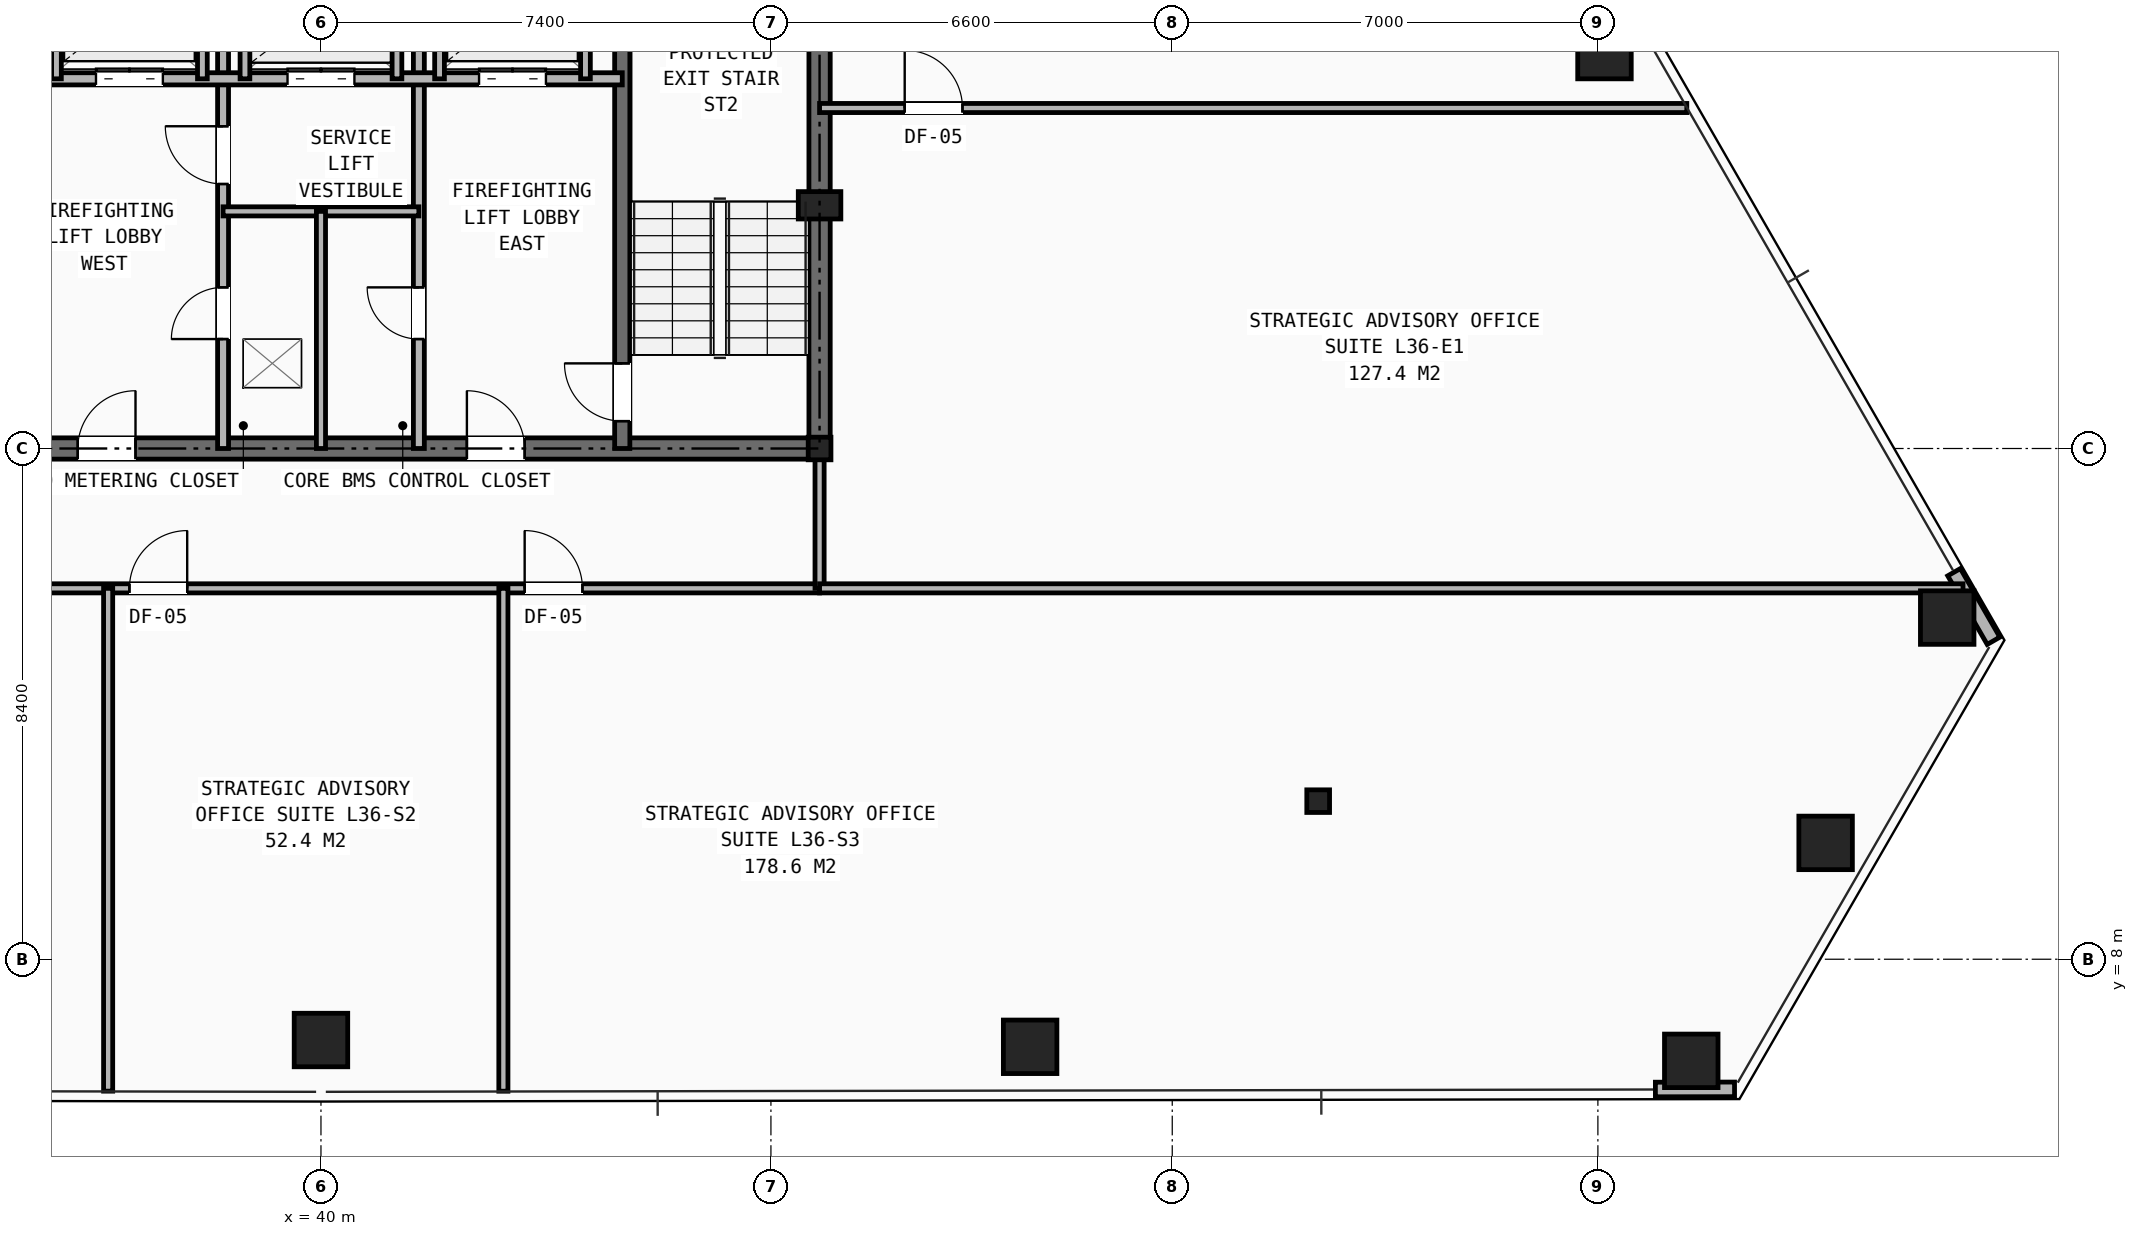
"""IFC4 building model, lengths in metres.
Left out: names, types, materials, properties, quantities, classifications, styles, units other than length and angle.
Written with IfcOpenShell. Run it as: python <this file> out.ifc"""

import sys

from ifc_helpers import new_model, si_unit, direction, frame, frame_2d, origin, origin_2d, place, context, subcontext, project, spatial, rectangle, hollow_rectangle, i_section, extrude, element, fill, save


model = new_model("IFC4")
c1 = context("Model", 3, precision=1e-05, world=origin(), true_north=direction((0.0, 1.0)))
c2 = subcontext(c1, "Body", "Model", "MODEL_VIEW")
j1 = project(units=[si_unit("LENGTHUNIT", "METRE"), si_unit("PLANEANGLEUNIT", "RADIAN")], contexts=[c1])
p1 = place(None, origin())
s1 = spatial("IfcSite", under=j1, at=p1, CompositionType="ELEMENT")
p2 = place(p1, origin())
s2 = spatial("IfcBuilding", under=s1, at=p2, CompositionType="ELEMENT")
p3 = place(p2, frame((0.0, 0.0, 126.35)))
s3 = spatial("IfcBuildingStorey", under=s2, at=p3, CompositionType="ELEMENT", Elevation=126.35)
for number, where, z_axis, x_axis in (
    (1, (48.2, 16.4, 0.0), (0.0, 0.0, 1.0), (1.0, 0.0, 0.0)),
    (2, (56.4, 10.6, 0.0), (0.0, 0.0, 1.0), (1.0, 0.0, 0.0)),
):
    element("IfcColumn", number, at=place(p3, frame(where, z_axis=z_axis, x_axis=x_axis)), inside=s3, PredefinedType="COLUMN", context=c2, shape_type="SweptSolid", body=[
        extrude(i_section(OverallWidth=0.374, OverallDepth=0.372, WebThickness=0.016, FlangeThickness=0.026, at=origin_2d()), origin(), (0.0, 0.0, 1.0), 3.45),
    ])
p4 = place(p3, frame((48.2, 20.4, 0.0), z_axis=(0.0, 0.0, 1.0), x_axis=(1.0, 0.0, 0.0)))
e3 = element("IfcColumn", 3, at=p4, inside=s3, PredefinedType="PILASTER", context=c2, shape_type="SweptSolid", body=[
    extrude(rectangle(XDim=0.7, YDim=0.45, at=origin_2d()), origin(), (0.0, 0.0, 1.0), 3.45),
])
for number, where, z_axis, x_axis in (
    (4, (40.0, 6.671, 0.0), (0.0, 0.0, 1.0), (1.0, 0.0, 0.0)),
    (5, (51.663, 6.56, 0.0), (0.0, 0.0, 1.0), (1.0, 0.0, 0.0)),
    (6, (62.536, 6.329, 0.0), (0.0, 0.0, 1.0), (1.0, 0.0, 0.0)),
    (7, (64.745, 9.913, 0.0), (0.0, 0.0, 1.0), (1.0, 0.0, 0.0)),
    (8, (66.745, 13.619, 0.0), (0.0, 0.0, 1.0), (1.0, 0.0, 0.0)),
    (9, (61.108, 22.92, 0.0), (0.0, 0.0, 1.0), (1.0, 0.0, 0.0)),
):
    element("IfcColumn", number, at=place(p3, frame(where, z_axis=z_axis, x_axis=x_axis)), inside=s3, PredefinedType="COLUMN", context=c2, shape_type="SweptSolid", body=[
        extrude(hollow_rectangle(XDim=0.88, YDim=0.88, WallThickness=0.06, at=origin_2d()), origin(), (0.0, 0.0, 1.0), 3.45),
    ])
p5 = place(p3, frame((61.946, 5.858, 0.0), z_axis=(0.0, 0.0, 1.0), x_axis=(0.999998574928, 0.001688236199, 0.0)))
e10 = element("IfcWall", 10, at=p5, inside=s3, PredefinedType="SHEAR", context=c2, shape_type="SweptSolid", body=[
    extrude(rectangle(XDim=1.302, YDim=0.24, at=frame_2d((0.651, 0.0))), origin(), (0.0, 0.0, 1.0), 2.583),
])
p6 = place(p3, frame((67.507, 13.237, 0.0), z_axis=(0.0, 0.0, 1.0), x_axis=(-0.498460550087, 0.86691238312, 0.0)))
e11 = element("IfcWall", 11, at=p6, inside=s3, PredefinedType="SHEAR", context=c2, shape_type="SweptSolid", body=[
    extrude(rectangle(XDim=1.301, YDim=0.24, at=frame_2d((0.651, 0.0))), origin(), (0.0, 0.0, 1.0), 2.583),
])
p7 = place(p3, frame((31.8, 16.4, 0.0), z_axis=(0.0, 0.0, 1.0), x_axis=(1.0, 0.0, 0.0)))
e12 = element("IfcWall", 12, at=p7, inside=s3, PredefinedType="SHEAR", context=c2, shape_type="SweptSolid", body=[
    extrude(rectangle(XDim=16.4, YDim=0.35, at=frame_2d((8.2, 0.0))), origin(), (0.0, 0.0, 1.0), 3.21),
])
p8 = place(p7, frame((4.2, 0.0, 0.0)))
e13 = element("IfcOpeningElement", 13, at=p8, cuts=e12, PredefinedType="OPENING", context=c2, shape_type="SweptSolid", body=[
    extrude(rectangle(XDim=0.95, YDim=2.1, at=frame_2d((0.475, 1.05))), frame((0.0, 0.185, 0.0), z_axis=(0.0, -1.0, 0.0), x_axis=(1.0, 0.0, 0.0)), (0.0, 0.0, 1.0), 0.37),
])
p9 = place(p7, frame((10.6, 0.0, 0.0)))
e14 = element("IfcOpeningElement", 14, at=p9, cuts=e12, PredefinedType="OPENING", context=c2, shape_type="SweptSolid", body=[
    extrude(rectangle(XDim=0.95, YDim=2.1, at=frame_2d((0.475, 1.05))), frame((0.0, 0.185, 0.0), z_axis=(0.0, -1.0, 0.0), x_axis=(1.0, 0.0, 0.0)), (0.0, 0.0, 1.0), 0.37),
])
p10 = place(p3, frame((48.2, 16.4, 0.0), z_axis=(0.0, 0.0, 1.0), x_axis=(0.0, 1.0, 0.0)))
e15 = element("IfcWall", 15, at=p10, inside=s3, PredefinedType="SHEAR", context=c2, shape_type="SweptSolid", body=[
    extrude(rectangle(XDim=14.8, YDim=0.35, at=frame_2d((7.4, 0.0))), origin(), (0.0, 0.0, 1.0), 3.21),
])
p11 = place(p10, frame((11.0, 0.0, 0.0)))
e16 = element("IfcOpeningElement", 16, at=p11, cuts=e15, PredefinedType="OPENING", context=c2, shape_type="SweptSolid", body=[
    extrude(rectangle(XDim=1.1, YDim=2.15, at=frame_2d((0.55, 1.075))), frame((0.0, 0.185, 0.0), z_axis=(0.0, -1.0, 0.0), x_axis=(1.0, 0.0, 0.0)), (0.0, 0.0, 1.0), 0.37),
])
p12 = place(p3, frame((44.955, 16.4, 0.0), z_axis=(0.0, 0.0, 1.0), x_axis=(0.0, 1.0, 0.0)))
e17 = element("IfcWall", 17, at=p12, inside=s3, PredefinedType="SHEAR", context=c2, shape_type="SweptSolid", body=[
    extrude(rectangle(XDim=8.4, YDim=0.25, at=frame_2d((4.2, 0.0))), origin(), (0.0, 0.0, 1.0), 3.21),
])
p13 = place(p12, frame((0.45, 0.0, 0.0)))
e18 = element("IfcOpeningElement", 18, at=p13, cuts=e17, PredefinedType="OPENING", context=c2, shape_type="SweptSolid", body=[
    extrude(rectangle(XDim=0.95, YDim=2.1, at=frame_2d((0.475, 1.05))), frame((0.0, 0.135, 0.0), z_axis=(0.0, -1.0, 0.0), x_axis=(1.0, 0.0, 0.0)), (0.0, 0.0, 1.0), 0.27),
])
p14 = place(p3, frame((38.39, 16.4, 0.0), z_axis=(0.0, 0.0, 1.0), x_axis=(0.0, 1.0, 0.0)))
e19 = element("IfcWall", 19, at=p14, inside=s3, PredefinedType="PARTITIONING", context=c2, shape_type="SweptSolid", body=[
    extrude(rectangle(XDim=8.4, YDim=0.18, at=frame_2d((4.2, 0.0))), origin(), (0.0, 0.0, 1.0), 2.661),
])
p15 = place(p14, frame((1.8, 0.0, 0.0)))
e20 = element("IfcOpeningElement", 20, at=p15, cuts=e19, PredefinedType="OPENING", context=c2, shape_type="SweptSolid", body=[
    extrude(rectangle(XDim=0.85, YDim=2.05, at=frame_2d((0.425, 1.025))), frame((0.0, 0.1, 0.0), z_axis=(0.0, -1.0, 0.0), x_axis=(1.0, 0.0, 0.0)), (0.0, 0.0, 1.0), 0.2),
])
p16 = place(p14, frame((4.35, 0.0, 0.0)))
e21 = element("IfcOpeningElement", 21, at=p16, cuts=e19, PredefinedType="OPENING", context=c2, shape_type="SweptSolid", body=[
    extrude(rectangle(XDim=0.95, YDim=2.1, at=frame_2d((0.475, 1.05))), frame((0.0, 0.1, 0.0), z_axis=(0.0, -1.0, 0.0), x_axis=(1.0, 0.0, 0.0)), (0.0, 0.0, 1.0), 0.2),
])
p17 = place(p3, frame((41.61, 16.4, 0.0), z_axis=(0.0, 0.0, 1.0), x_axis=(0.0, 1.0, 0.0)))
e22 = element("IfcWall", 22, at=p17, inside=s3, PredefinedType="PARTITIONING", context=c2, shape_type="SweptSolid", body=[
    extrude(rectangle(XDim=8.4, YDim=0.18, at=frame_2d((4.2, 0.0))), origin(), (0.0, 0.0, 1.0), 2.661),
])
p18 = place(p17, frame((1.8, 0.0, 0.0)))
e23 = element("IfcOpeningElement", 23, at=p18, cuts=e22, PredefinedType="OPENING", context=c2, shape_type="SweptSolid", body=[
    extrude(rectangle(XDim=0.85, YDim=2.05, at=frame_2d((0.425, 1.025))), frame((0.0, 0.1, 0.0), z_axis=(0.0, -1.0, 0.0), x_axis=(1.0, 0.0, 0.0)), (0.0, 0.0, 1.0), 0.2),
])
p19 = place(p3, frame((35.045, 22.48, 0.0), z_axis=(0.0, 0.0, 1.0), x_axis=(1.0, 0.0, 0.0)))
e24 = element("IfcWall", 24, at=p19, inside=s3, PredefinedType="SOLIDWALL", context=c2, shape_type="SweptSolid", body=[
    extrude(rectangle(XDim=9.91, YDim=0.2, at=frame_2d((4.955, 0.0))), origin(), (0.0, 0.0, 1.0), 3.21),
])
p20 = place(p19, frame((1.255, 0.0, 0.0)))
e25 = element("IfcOpeningElement", 25, at=p20, cuts=e24, PredefinedType="OPENING", context=c2, shape_type="SweptSolid", body=[
    extrude(rectangle(XDim=1.1, YDim=2.15, at=frame_2d((0.55, 1.075))), frame((0.0, 0.11, 0.0), z_axis=(0.0, -1.0, 0.0), x_axis=(1.0, 0.0, 0.0)), (0.0, 0.0, 1.0), 0.22),
])
p21 = place(p19, frame((7.555, 0.0, 0.0)))
e26 = element("IfcOpeningElement", 26, at=p21, cuts=e24, PredefinedType="OPENING", context=c2, shape_type="SweptSolid", body=[
    extrude(rectangle(XDim=1.1, YDim=2.15, at=frame_2d((0.55, 1.075))), frame((0.0, 0.11, 0.0), z_axis=(0.0, -1.0, 0.0), x_axis=(1.0, 0.0, 0.0)), (0.0, 0.0, 1.0), 0.22),
])
p22 = place(p19, frame((4.405, 0.0, 0.0)))
e27 = element("IfcOpeningElement", 27, at=p22, cuts=e24, PredefinedType="OPENING", context=c2, shape_type="SweptSolid", body=[
    extrude(rectangle(XDim=1.1, YDim=2.15, at=frame_2d((0.55, 1.075))), frame((0.0, 0.11, 0.0), z_axis=(0.0, -1.0, 0.0), x_axis=(1.0, 0.0, 0.0)), (0.0, 0.0, 1.0), 0.22),
])
p23 = place(p3, frame((38.39, 20.3, 0.0), z_axis=(0.0, 0.0, 1.0), x_axis=(1.0, 0.0, 0.0)))
e28 = element("IfcWall", 28, at=p23, inside=s3, PredefinedType="PARTITIONING", context=c2, shape_type="SweptSolid", body=[
    extrude(rectangle(XDim=3.22, YDim=0.15, at=frame_2d((1.61, 0.0))), origin(), (0.0, 0.0, 1.0), 3.21),
])
p24 = place(p3, frame((40.0, 16.4, 0.0), z_axis=(0.0, 0.0, 1.0), x_axis=(0.0, 1.0, 0.0)))
e29 = element("IfcWall", 29, at=p24, inside=s3, PredefinedType="PARTITIONING", context=c2, shape_type="SweptSolid", body=[
    extrude(rectangle(XDim=3.9, YDim=0.15, at=frame_2d((1.95, 0.0))), origin(), (0.0, 0.0, 1.0), 2.661),
])
for number, where, z_axis, x_axis in (
    (30, (35.65, 22.48, 0.0), (0.0, 0.0, 1.0), (0.0, 1.0, 0.0)),
    (31, (38.05, 22.48, 0.0), (0.0, 0.0, 1.0), (0.0, 1.0, 0.0)),
    (32, (41.95, 22.48, 0.0), (0.0, 0.0, 1.0), (0.0, 1.0, 0.0)),
    (33, (44.35, 22.48, 0.0), (0.0, 0.0, 1.0), (0.0, 1.0, 0.0)),
    (34, (38.75, 22.48, 0.0), (0.0, 0.0, 1.0), (0.0, 1.0, 0.0)),
    (35, (41.25, 22.48, 0.0), (0.0, 0.0, 1.0), (0.0, 1.0, 0.0)),
):
    element("IfcWall", number, at=place(p3, frame(where, z_axis=z_axis, x_axis=x_axis)), inside=s3, PredefinedType="SOLIDWALL", context=c2, shape_type="SweptSolid", body=[
        extrude(rectangle(XDim=2.32, YDim=0.16, at=frame_2d((1.16, 0.0))), origin(), (0.0, 0.0, 1.0), 3.21),
    ])
p25 = place(p3, frame((29.6, 14.1, 0.0), z_axis=(0.0, 0.0, 1.0), x_axis=(1.0, 0.0, 0.0)))
e36 = element("IfcWall", 36, at=p25, inside=s3, PredefinedType="PARTITIONING", context=c2, shape_type="SweptSolid", body=[
    extrude(rectangle(XDim=18.6, YDim=0.15, at=frame_2d((9.3, 0.0))), origin(), (0.0, 0.0, 1.0), 2.225),
])
p26 = place(p25, frame((0.55, 0.0, 0.0)))
e37 = element("IfcOpeningElement", 37, at=p26, cuts=e36, PredefinedType="OPENING", context=c2, shape_type="SweptSolid", body=[
    extrude(rectangle(XDim=0.95, YDim=2.1, at=frame_2d((0.475, 1.05))), frame((0.0, 0.085, 0.0), z_axis=(0.0, -1.0, 0.0), x_axis=(1.0, 0.0, 0.0)), (0.0, 0.0, 1.0), 0.17),
])
p27 = place(p25, frame((7.25, 0.0, 0.0)))
e38 = element("IfcOpeningElement", 38, at=p27, cuts=e36, PredefinedType="OPENING", context=c2, shape_type="SweptSolid", body=[
    extrude(rectangle(XDim=0.95, YDim=2.1, at=frame_2d((0.475, 1.05))), frame((0.0, 0.085, 0.0), z_axis=(0.0, -1.0, 0.0), x_axis=(1.0, 0.0, 0.0)), (0.0, 0.0, 1.0), 0.17),
])
p28 = place(p25, frame((13.75, 0.0, 0.0)))
e39 = element("IfcOpeningElement", 39, at=p28, cuts=e36, PredefinedType="OPENING", context=c2, shape_type="SweptSolid", body=[
    extrude(rectangle(XDim=0.95, YDim=2.1, at=frame_2d((0.475, 1.05))), frame((0.0, 0.085, 0.0), z_axis=(0.0, -1.0, 0.0), x_axis=(1.0, 0.0, 0.0)), (0.0, 0.0, 1.0), 0.17),
])
p29 = place(p3, frame((48.2, 14.1, 0.0), z_axis=(0.0, 0.0, 1.0), x_axis=(0.0, 1.0, 0.0)))
e40 = element("IfcWall", 40, at=p29, inside=s3, PredefinedType="PARTITIONING", context=c2, shape_type="SweptSolid", body=[
    extrude(rectangle(XDim=2.3, YDim=0.15, at=frame_2d((1.15, 0.0))), origin(), (0.0, 0.0, 1.0), 2.661),
])
p30 = place(p3, frame((36.5, 5.83, 0.0), z_axis=(0.0, 0.0, 1.0), x_axis=(0.0, 1.0, 0.0)))
e41 = element("IfcWall", 41, at=p30, inside=s3, PredefinedType="PARTITIONING", context=c2, shape_type="SweptSolid", body=[
    extrude(rectangle(XDim=8.27, YDim=0.15, at=frame_2d((4.135, 0.0))), origin(), (0.0, 0.0, 1.0), 2.225),
])
p31 = place(p3, frame((43.0, 5.83, 0.0), z_axis=(0.0, 0.0, 1.0), x_axis=(0.0, 1.0, 0.0)))
e42 = element("IfcWall", 42, at=p31, inside=s3, PredefinedType="PARTITIONING", context=c2, shape_type="SweptSolid", body=[
    extrude(rectangle(XDim=8.271, YDim=0.15, at=frame_2d((4.135, 0.0))), origin(), (0.0, 0.0, 1.0), 2.589),
])
p32 = place(p3, frame((48.2, 14.1, 0.0), z_axis=(0.0, 0.0, 1.0), x_axis=(1.0, 0.0, 0.0)))
e43 = element("IfcWall", 43, at=p32, inside=s3, PredefinedType="PARTITIONING", context=c2, shape_type="SweptSolid", body=[
    extrude(rectangle(XDim=18.805, YDim=0.15, at=frame_2d((9.402, 0.0))), origin(), (0.0, 0.0, 1.0), 2.589),
])
p33 = place(p3, frame((48.2, 22.0, 0.0), z_axis=(0.0, 0.0, 1.0), x_axis=(1.0, 0.0, 0.0)))
e44 = element("IfcWall", 44, at=p33, inside=s3, PredefinedType="PARTITIONING", context=c2, shape_type="SweptSolid", body=[
    extrude(rectangle(XDim=14.262, YDim=0.15, at=frame_2d((7.131, 0.0))), origin(), (0.0, 0.0, 1.0), 2.589),
])
p34 = place(p33, frame((1.4, 0.0, 0.0)))
e45 = element("IfcOpeningElement", 45, at=p34, cuts=e44, PredefinedType="OPENING", context=c2, shape_type="SweptSolid", body=[
    extrude(rectangle(XDim=0.95, YDim=2.1, at=frame_2d((0.475, 1.05))), frame((0.0, 0.085, 0.0), z_axis=(0.0, -1.0, 0.0), x_axis=(1.0, 0.0, 0.0)), (0.0, 0.0, 1.0), 0.17),
])
p35 = place(p15, origin())
e46 = element("IfcDoor", 46, at=p35, inside=s3, OperationType="SINGLE_SWING_LEFT", PredefinedType="DOOR", context=c2, shape_type="SweptSolid", body=[
    extrude(rectangle(XDim=0.85, YDim=2.05, at=frame_2d((0.425, 1.025))), frame((0.0, 0.025, 0.0), z_axis=(0.0, -1.0, 0.0), x_axis=(1.0, 0.0, 0.0)), (0.0, 0.0, 1.0), 0.05),
])
fill(e20, e46)
p36 = place(p18, origin())
e47 = element("IfcDoor", 47, at=p36, inside=s3, OperationType="SINGLE_SWING_RIGHT", PredefinedType="DOOR", context=c2, shape_type="SweptSolid", body=[
    extrude(rectangle(XDim=0.85, YDim=2.05, at=frame_2d((0.425, 1.025))), frame((0.0, 0.025, 0.0), z_axis=(0.0, -1.0, 0.0), x_axis=(1.0, 0.0, 0.0)), (0.0, 0.0, 1.0), 0.05),
])
fill(e23, e47)
p37 = place(p16, origin())
e48 = element("IfcDoor", 48, at=p37, inside=s3, OperationType="SINGLE_SWING_RIGHT", PredefinedType="DOOR", context=c2, shape_type="SweptSolid", body=[
    extrude(rectangle(XDim=0.95, YDim=2.1, at=frame_2d((0.475, 1.05))), frame((0.0, 0.025, 0.0), z_axis=(0.0, -1.0, 0.0), x_axis=(1.0, 0.0, 0.0)), (0.0, 0.0, 1.0), 0.05),
])
fill(e21, e48)
p38 = place(p13, origin())
e49 = element("IfcDoor", 49, at=p38, inside=s3, OperationType="SINGLE_SWING_RIGHT", PredefinedType="DOOR", context=c2, shape_type="SweptSolid", body=[
    extrude(rectangle(XDim=0.95, YDim=2.1, at=frame_2d((0.475, 1.05))), frame((0.0, 0.025, 0.0), z_axis=(0.0, -1.0, 0.0), x_axis=(1.0, 0.0, 0.0)), (0.0, 0.0, 1.0), 0.05),
])
fill(e18, e49)
p39 = place(p8, origin())
e50 = element("IfcDoor", 50, at=p39, inside=s3, OperationType="SINGLE_SWING_RIGHT", PredefinedType="DOOR", context=c2, shape_type="SweptSolid", body=[
    extrude(rectangle(XDim=0.95, YDim=2.1, at=frame_2d((0.475, 1.05))), frame((0.0, 0.025, 0.0), z_axis=(0.0, -1.0, 0.0), x_axis=(1.0, 0.0, 0.0)), (0.0, 0.0, 1.0), 0.05),
])
fill(e13, e50)
p40 = place(p9, origin())
e51 = element("IfcDoor", 51, at=p40, inside=s3, OperationType="SINGLE_SWING_LEFT", PredefinedType="DOOR", context=c2, shape_type="SweptSolid", body=[
    extrude(rectangle(XDim=0.95, YDim=2.1, at=frame_2d((0.475, 1.05))), frame((0.0, 0.025, 0.0), z_axis=(0.0, -1.0, 0.0), x_axis=(1.0, 0.0, 0.0)), (0.0, 0.0, 1.0), 0.05),
])
fill(e14, e51)
p41 = place(p20, origin())
e52 = element("IfcDoor", 52, at=p41, inside=s3, OperationType="DOUBLE_DOOR_SLIDING", PredefinedType="DOOR", context=c2, shape_type="SweptSolid", body=[
    extrude(rectangle(XDim=1.1, YDim=2.15, at=frame_2d((0.55, 1.075))), frame((0.0, 0.025, 0.0), z_axis=(0.0, -1.0, 0.0), x_axis=(1.0, 0.0, 0.0)), (0.0, 0.0, 1.0), 0.05),
])
fill(e25, e52)
p42 = place(p21, origin())
e53 = element("IfcDoor", 53, at=p42, inside=s3, OperationType="DOUBLE_DOOR_SLIDING", PredefinedType="DOOR", context=c2, shape_type="SweptSolid", body=[
    extrude(rectangle(XDim=1.1, YDim=2.15, at=frame_2d((0.55, 1.075))), frame((0.0, 0.025, 0.0), z_axis=(0.0, -1.0, 0.0), x_axis=(1.0, 0.0, 0.0)), (0.0, 0.0, 1.0), 0.05),
])
fill(e26, e53)
p43 = place(p22, origin())
e54 = element("IfcDoor", 54, at=p43, inside=s3, OperationType="DOUBLE_DOOR_SLIDING", PredefinedType="DOOR", context=c2, shape_type="SweptSolid", body=[
    extrude(rectangle(XDim=1.1, YDim=2.15, at=frame_2d((0.55, 1.075))), frame((0.0, 0.025, 0.0), z_axis=(0.0, -1.0, 0.0), x_axis=(1.0, 0.0, 0.0)), (0.0, 0.0, 1.0), 0.05),
])
fill(e27, e54)
p44 = place(p27, origin())
e55 = element("IfcDoor", 55, at=p44, inside=s3, OperationType="SINGLE_SWING_RIGHT", PredefinedType="DOOR", context=c2, shape_type="SweptSolid", body=[
    extrude(rectangle(XDim=0.95, YDim=2.1, at=frame_2d((0.475, 1.05))), frame((0.0, 0.025, 0.0), z_axis=(0.0, -1.0, 0.0), x_axis=(1.0, 0.0, 0.0)), (0.0, 0.0, 1.0), 0.05),
])
fill(e38, e55)
p45 = place(p28, origin())
e56 = element("IfcDoor", 56, at=p45, inside=s3, OperationType="SINGLE_SWING_LEFT", PredefinedType="DOOR", context=c2, shape_type="SweptSolid", body=[
    extrude(rectangle(XDim=0.95, YDim=2.1, at=frame_2d((0.475, 1.05))), frame((0.0, 0.025, 0.0), z_axis=(0.0, -1.0, 0.0), x_axis=(1.0, 0.0, 0.0)), (0.0, 0.0, 1.0), 0.05),
])
fill(e39, e56)
p46 = place(p34, origin())
e57 = element("IfcDoor", 57, at=p46, inside=s3, OperationType="SINGLE_SWING_LEFT", PredefinedType="DOOR", context=c2, shape_type="SweptSolid", body=[
    extrude(rectangle(XDim=0.95, YDim=2.1, at=frame_2d((0.475, 1.05))), frame((0.0, 0.025, 0.0), z_axis=(0.0, -1.0, 0.0), x_axis=(1.0, 0.0, 0.0)), (0.0, 0.0, 1.0), 0.05),
])
fill(e45, e57)
save(model, sys.argv[1])
